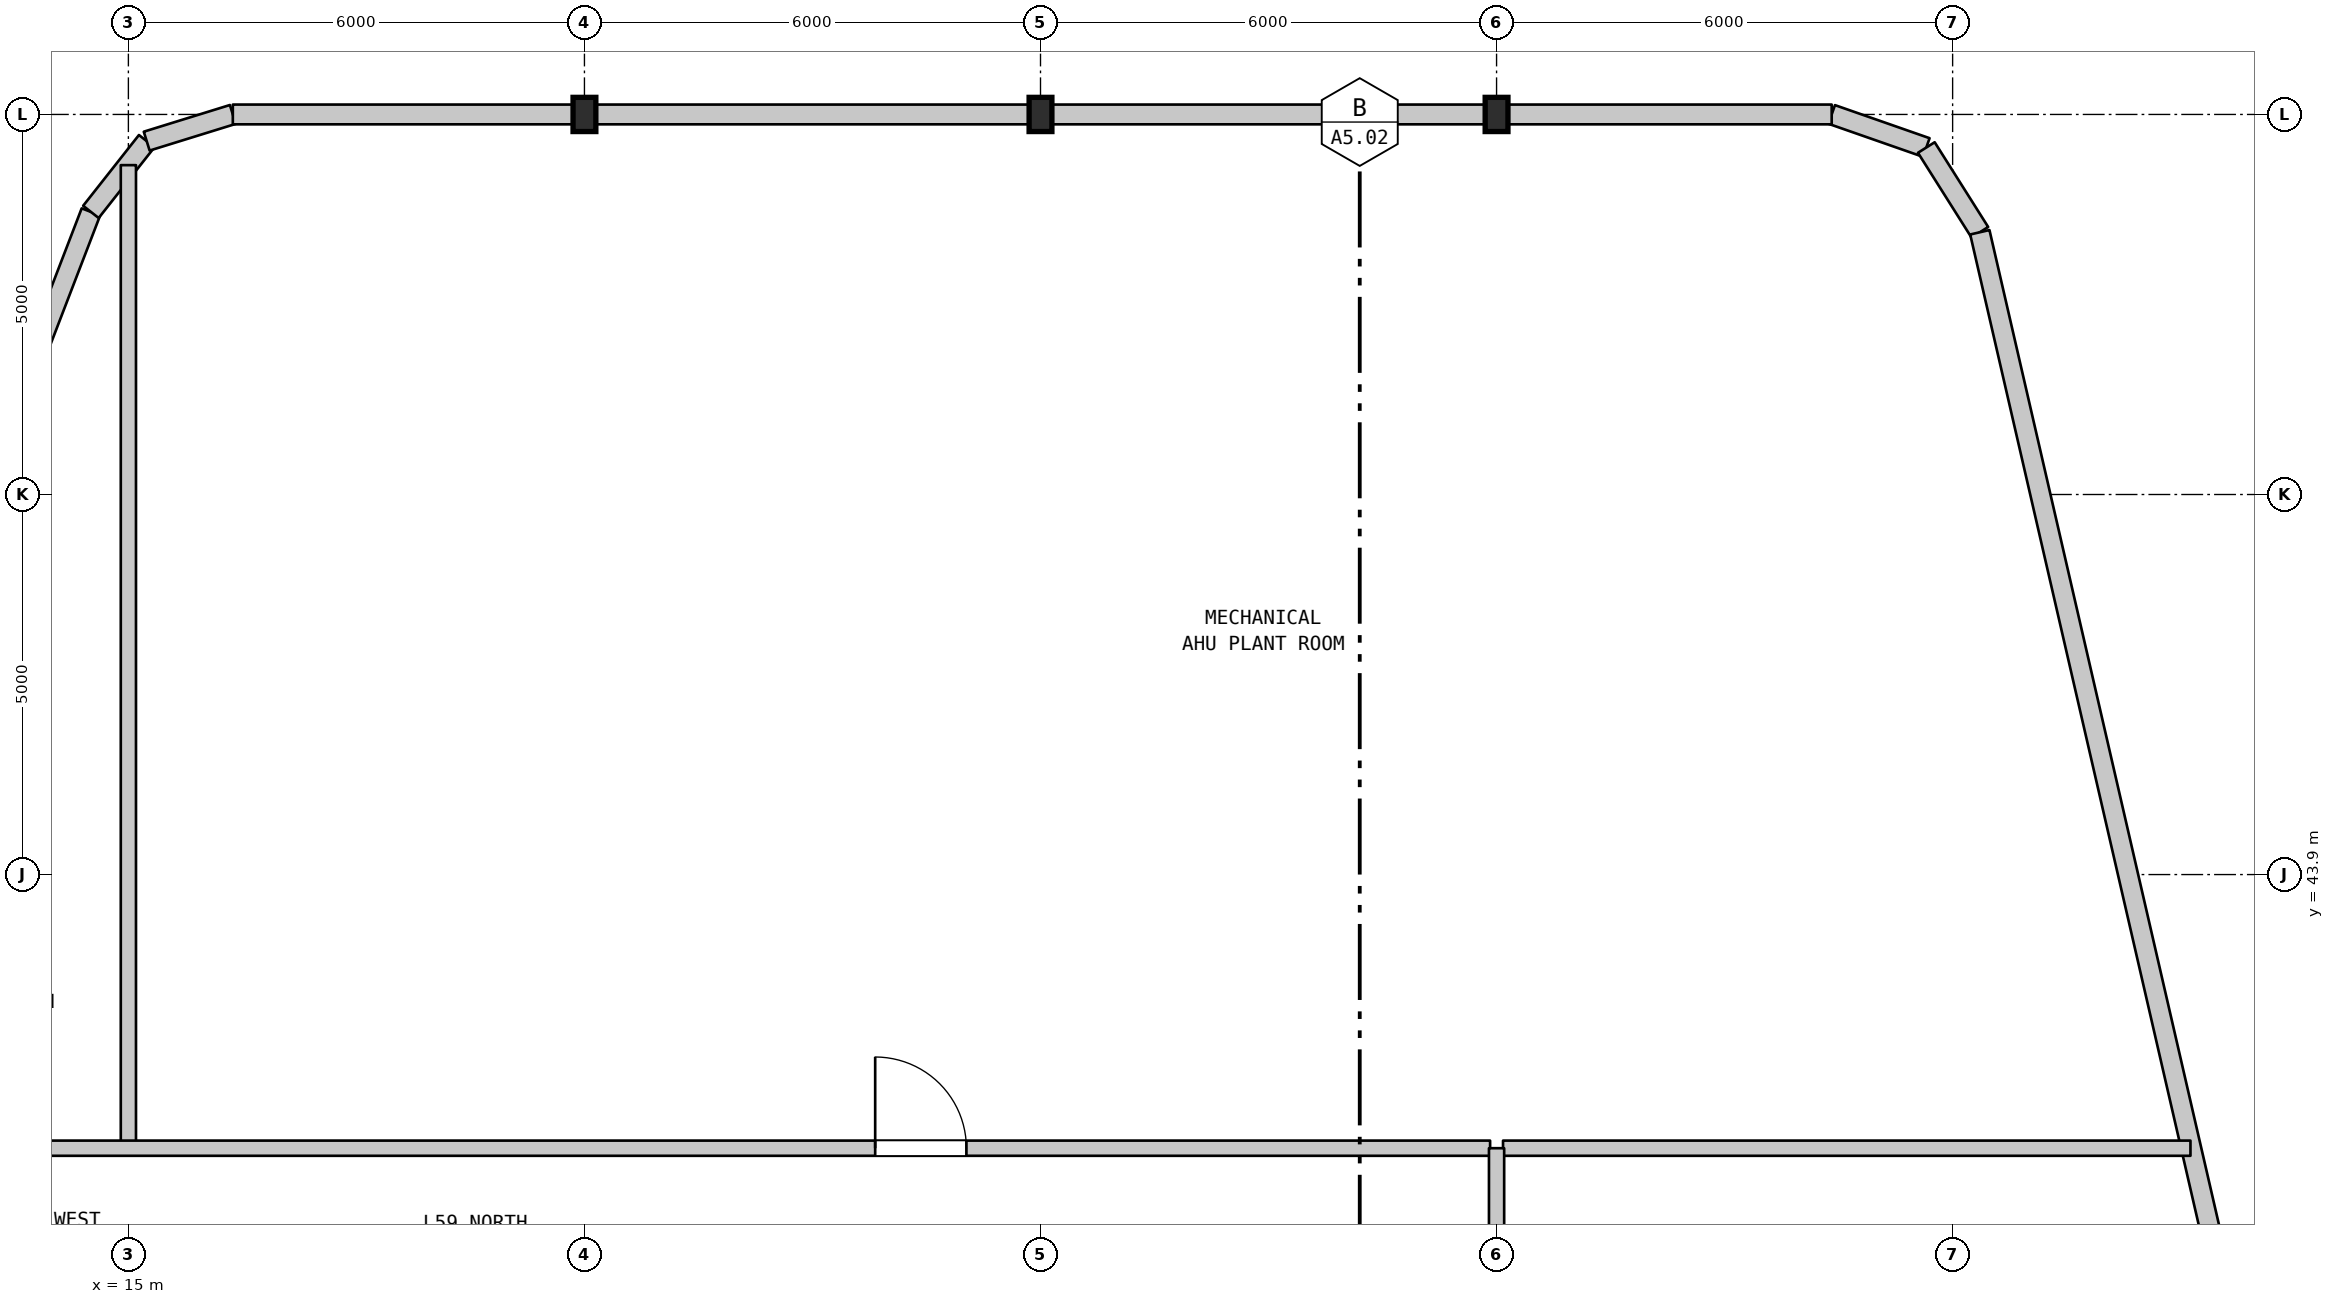
"""IFC4 building model, lengths in metres.
Left out: names, types, materials, properties, quantities, classifications, styles, units other than length and angle.
Written with IfcOpenShell. Run it as: python <this file> out.ifc"""

import sys

from ifc_helpers import new_model, si_unit, direction, frame, frame_2d, origin, origin_2d, place, context, subcontext, project, spatial, rectangle, i_section, extrude, element, fill, save


model = new_model("IFC4")
c1 = context("Model", 3, precision=1e-05, world=origin(), true_north=direction((0.0, 1.0)))
c2 = subcontext(c1, "Body", "Model", "MODEL_VIEW")
j1 = project(units=[si_unit("LENGTHUNIT", "METRE"), si_unit("PLANEANGLEUNIT", "RADIAN")], contexts=[c1])
p1 = place(None, origin())
s1 = spatial("IfcSite", under=j1, at=p1, CompositionType="ELEMENT")
p2 = place(p1, origin())
s2 = spatial("IfcBuilding", under=s1, at=p2, CompositionType="ELEMENT")
p3 = place(p2, frame((0.0, 0.0, 237.6)))
s3 = spatial("IfcBuildingStorey", under=s2, at=p3, CompositionType="ELEMENT", Elevation=237.6)
for number, where, z_axis, x_axis in (
    (1, (21.0, 53.9, 0.0), (0.0, 0.0, 1.0), (1.0, 0.0, 0.0)),
    (2, (27.0, 53.9, 0.0), (0.0, 0.0, 1.0), (1.0, 0.0, 0.0)),
    (3, (33.0, 53.9, 0.0), (0.0, 0.0, 1.0), (1.0, 0.0, 0.0)),
):
    element("IfcColumn", number, at=place(p3, frame(where, z_axis=z_axis, x_axis=x_axis)), inside=s3, PredefinedType="COLUMN", context=c2, shape_type="SweptSolid", body=[
        extrude(i_section(OverallWidth=0.3, OverallDepth=0.45, WebThickness=0.014, FlangeThickness=0.026, FilletRadius=0.027, at=origin_2d()), origin(), (0.0, 0.0, 1.0), 5.2),
    ])
p4 = place(p3, frame((3.497, 23.993, 0.0), z_axis=(0.0, 0.0, 1.0), x_axis=(0.358990281293, 0.93334129767, 0.0)))
e4 = element("IfcWall", 4, at=p4, inside=s3, PredefinedType="STANDARD", context=c2, shape_type="SweptSolid", body=[
    extrude(rectangle(XDim=30.669, YDim=0.26, at=frame_2d((15.335, 0.0))), origin(), (0.0, 0.0, 1.0), 4.88),
])
p5 = place(p3, frame((14.507, 52.618, 0.0), z_axis=(0.0, 0.0, 1.0), x_axis=(0.619003121736, 0.78538852505, 0.0)))
e5 = element("IfcWall", 5, at=p5, inside=s3, PredefinedType="STANDARD", context=c2, shape_type="SweptSolid", body=[
    extrude(rectangle(XDim=1.186, YDim=0.26, at=frame_2d((0.593, 0.0))), origin(), (0.0, 0.0, 1.0), 4.88),
])
p6 = place(p3, frame((15.241, 53.549, 0.0), z_axis=(0.0, 0.0, 1.0), x_axis=(0.955256816454, 0.295777643879, 0.0)))
e6 = element("IfcWall", 6, at=p6, inside=s3, PredefinedType="STANDARD", context=c2, shape_type="SweptSolid", body=[
    extrude(rectangle(XDim=1.186, YDim=0.26, at=frame_2d((0.593, 0.0))), origin(), (0.0, 0.0, 1.0), 4.88),
])
p7 = place(p3, frame((16.374, 53.9, 0.0), z_axis=(0.0, 0.0, 1.0), x_axis=(1.0, 0.0, 0.0)))
e7 = element("IfcWall", 7, at=p7, inside=s3, PredefinedType="STANDARD", context=c2, shape_type="SweptSolid", body=[
    extrude(rectangle(XDim=4.626, YDim=0.26, at=frame_2d((2.313, 0.0))), origin(), (0.0, 0.0, 1.0), 4.88),
])
p8 = place(p3, frame((37.409, 53.9, 0.0), z_axis=(0.0, 0.0, 1.0), x_axis=(0.944089004862, -0.329690689737, 0.0)))
e8 = element("IfcWall", 8, at=p8, inside=s3, PredefinedType="STANDARD", context=c2, shape_type="SweptSolid", body=[
    extrude(rectangle(XDim=1.319, YDim=0.26, at=frame_2d((0.659, 0.0))), origin(), (0.0, 0.0, 1.0), 4.88),
])
p9 = place(p3, frame((38.654, 53.465, 0.0), z_axis=(0.0, 0.0, 1.0), x_axis=(0.53380488896, -0.845607675297, 0.0)))
e9 = element("IfcWall", 9, at=p9, inside=s3, PredefinedType="STANDARD", context=c2, shape_type="SweptSolid", body=[
    extrude(rectangle(XDim=1.319, YDim=0.26, at=frame_2d((0.659, 0.0))), origin(), (0.0, 0.0, 1.0), 4.88),
])
p10 = place(p3, frame((39.358, 52.35, 0.0), z_axis=(0.0, 0.0, 1.0), x_axis=(0.224849558511, -0.974393491377, 0.0)))
e10 = element("IfcWall", 10, at=p10, inside=s3, PredefinedType="STANDARD", context=c2, shape_type="SweptSolid", body=[
    extrude(rectangle(XDim=25.093, YDim=0.26, at=frame_2d((12.546, 0.0))), origin(), (0.0, 0.0, 1.0), 4.88),
])
p11 = place(p3, frame((15.0, 40.3, 0.0), z_axis=(0.0, 0.0, 1.0), x_axis=(0.0, 1.0, 0.0)))
e11 = element("IfcWall", 11, at=p11, inside=s3, PredefinedType="STANDARD", context=c2, shape_type="SweptSolid", body=[
    extrude(rectangle(XDim=12.933, YDim=0.2, at=frame_2d((6.466, 0.0))), origin(), (0.0, 0.0, 1.0), 4.88),
])
p12 = place(p3, frame((12.685, 40.3, 0.0), z_axis=(0.0, 0.0, 1.0), x_axis=(1.0, 0.0, 0.0)))
e12 = element("IfcWall", 12, at=p12, inside=s3, PredefinedType="STANDARD", context=c2, shape_type="SweptSolid", body=[
    extrude(rectangle(XDim=20.23, YDim=0.2, at=frame_2d((10.115, 0.0))), origin(), (0.0, 0.0, 1.0), 4.88),
])
p13 = place(p12, frame((12.14, 0.0, 0.0)))
e13 = element("IfcOpeningElement", 13, at=p13, cuts=e12, PredefinedType="OPENING", context=c2, shape_type="SweptSolid", body=[
    extrude(rectangle(XDim=1.2, YDim=2.2, at=frame_2d((0.6, 1.1))), frame((0.0, 0.11, 0.0), z_axis=(0.0, -1.0, 0.0), x_axis=(1.0, 0.0, 0.0)), (0.0, 0.0, 1.0), 0.22),
])
p14 = place(p3, frame((33.085, 40.3, 0.0), z_axis=(0.0, 0.0, 1.0), x_axis=(1.0, 0.0, 0.0)))
e14 = element("IfcWall", 14, at=p14, inside=s3, PredefinedType="STANDARD", context=c2, shape_type="SweptSolid", body=[
    extrude(rectangle(XDim=9.044, YDim=0.2, at=frame_2d((4.522, 0.0))), origin(), (0.0, 0.0, 1.0), 4.88),
])
p15 = place(p3, frame((21.0, 53.9, 0.0), z_axis=(0.0, 0.0, 1.0), x_axis=(1.0, 0.0, 0.0)))
e15 = element("IfcWall", 15, at=p15, inside=s3, PredefinedType="STANDARD", context=c2, shape_type="SweptSolid", body=[
    extrude(rectangle(XDim=12.0, YDim=0.26, at=frame_2d((6.0, 0.0))), origin(), (0.0, 0.0, 1.0), 4.53),
])
p16 = place(p3, frame((33.0, 53.9, 0.0), z_axis=(0.0, 0.0, 1.0), x_axis=(1.0, 0.0, 0.0)))
e16 = element("IfcWall", 16, at=p16, inside=s3, PredefinedType="STANDARD", context=c2, shape_type="SweptSolid", body=[
    extrude(rectangle(XDim=4.409, YDim=0.26, at=frame_2d((2.205, 0.0))), origin(), (0.0, 0.0, 1.0), 4.88),
])
p17 = place(p3, frame((33.0, 37.9, 0.0), z_axis=(0.0, 0.0, 1.0), x_axis=(0.0, 1.0, 0.0)))
e17 = element("IfcWall", 17, at=p17, inside=s3, PredefinedType="STANDARD", context=c2, shape_type="SweptSolid", body=[
    extrude(rectangle(XDim=2.4, YDim=0.2, at=frame_2d((1.2, 0.0))), origin(), (0.0, 0.0, 1.0), 4.28),
])
p18 = place(p13, origin())
e18 = element("IfcDoor", 18, at=p18, inside=s3, OperationType="SINGLE_SWING_LEFT", PredefinedType="DOOR", context=c2, shape_type="SweptSolid", body=[
    extrude(rectangle(XDim=1.2, YDim=2.2, at=frame_2d((0.6, 1.1))), frame((0.0, 0.025, 0.0), z_axis=(0.0, -1.0, 0.0), x_axis=(1.0, 0.0, 0.0)), (0.0, 0.0, 1.0), 0.05),
])
fill(e13, e18)
save(model, sys.argv[1])
